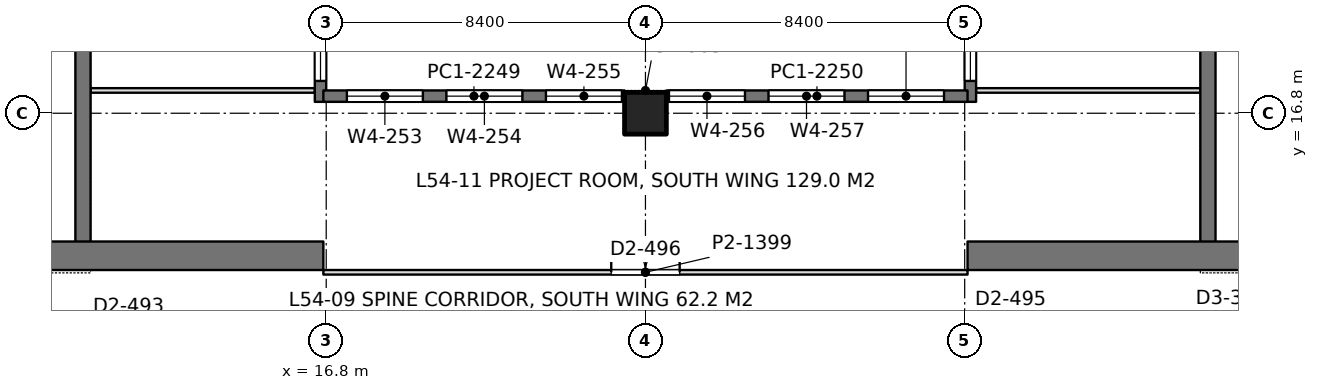
"""IFC4 building model, lengths in metres.
Left out: names, types, materials, properties, quantities, classifications, styles, units other than length and angle.
Written with IfcOpenShell. Run it as: python <this file> out.ifc"""

import sys

from ifc_helpers import new_model, si_unit, direction, frame, frame_2d, origin, origin_2d, place, context, subcontext, project, spatial, rectangle, extrude, element, fill, save


model = new_model("IFC4")
c1 = context("Model", 3, precision=1e-05, world=origin(), true_north=direction((0.0, 1.0)))
c2 = subcontext(c1, "Body", "Model", "MODEL_VIEW")
j1 = project(units=[si_unit("LENGTHUNIT", "METRE"), si_unit("PLANEANGLEUNIT", "RADIAN")], contexts=[c1])
p1 = place(None, origin())
s1 = spatial("IfcSite", under=j1, at=p1, CompositionType="ELEMENT")
p2 = place(p1, origin())
s2 = spatial("IfcBuilding", under=s1, at=p2, CompositionType="ELEMENT")
p3 = place(p2, frame((0.0, 0.0, 236.4)))
s3 = spatial("IfcBuildingStorey", under=s2, at=p3, CompositionType="ELEMENT", Elevation=236.4)
p4 = place(p3, frame((25.2, 16.8, 0.0), z_axis=(0.0, 0.0, 1.0), x_axis=(1.0, 0.0, 0.0)))
e1 = element("IfcColumn", 1, at=p4, inside=s3, PredefinedType="COLUMN", context=c2, shape_type="SweptSolid", body=[
    extrude(rectangle(XDim=1.1, YDim=1.1, at=origin_2d()), origin(), (0.0, 0.0, 1.0), 4.2),
])
p5 = place(p3, frame((-1.125, 13.05, 0.0), z_axis=(0.0, 0.0, 1.0), x_axis=(1.0, 0.0, 0.0)))
e2 = element("IfcWall", 2, at=p5, inside=s3, PredefinedType="SHEAR", context=c2, shape_type="SweptSolid", body=[
    extrude(rectangle(XDim=17.85, YDim=0.75, at=frame_2d((8.925, 0.0))), origin(), (0.0, 0.0, 1.0), 4.2),
])
p6 = place(p5, frame((8.875, 0.0, 0.0)))
e3 = element("IfcOpeningElement", 3, at=p6, cuts=e2, PredefinedType="OPENING", context=c2, shape_type="SweptSolid", body=[
    extrude(rectangle(XDim=1.8, YDim=2.4, at=frame_2d((0.9, 1.2))), frame((0.0, 0.385, 0.0), z_axis=(0.0, -1.0, 0.0), x_axis=(1.0, 0.0, 0.0)), (0.0, 0.0, 1.0), 0.77),
])
p7 = place(p3, frame((10.4, 13.05, 0.0), z_axis=(0.0, 0.0, 1.0), x_axis=(0.0, 1.0, 0.0)))
e4 = element("IfcWall", 4, at=p7, inside=s3, PredefinedType="SHEAR", context=c2, shape_type="SweptSolid", body=[
    extrude(rectangle(XDim=24.3, YDim=0.4, at=frame_2d((12.15, 0.0))), origin(), (0.0, 0.0, 1.0), 4.2),
])
p8 = place(p7, frame((15.75, 0.0, 0.0)))
e5 = element("IfcOpeningElement", 5, at=p8, cuts=e4, PredefinedType="OPENING", context=c2, shape_type="SweptSolid", body=[
    extrude(rectangle(XDim=1.1, YDim=2.2, at=frame_2d((0.55, 1.1))), frame((0.0, 0.21, 0.0), z_axis=(0.0, -1.0, 0.0), x_axis=(1.0, 0.0, 0.0)), (0.0, 0.0, 1.0), 0.42),
])
p9 = place(p7, frame((18.6, 0.0, 0.0)))
e6 = element("IfcOpeningElement", 6, at=p9, cuts=e4, PredefinedType="OPENING", context=c2, shape_type="SweptSolid", body=[
    extrude(rectangle(XDim=1.1, YDim=2.2, at=frame_2d((0.55, 1.1))), frame((0.0, 0.21, 0.0), z_axis=(0.0, -1.0, 0.0), x_axis=(1.0, 0.0, 0.0)), (0.0, 0.0, 1.0), 0.42),
])
p10 = place(p7, frame((21.45, 0.0, 0.0)))
e7 = element("IfcOpeningElement", 7, at=p10, cuts=e4, PredefinedType="OPENING", context=c2, shape_type="SweptSolid", body=[
    extrude(rectangle(XDim=1.1, YDim=2.2, at=frame_2d((0.55, 1.1))), frame((0.0, 0.21, 0.0), z_axis=(0.0, -1.0, 0.0), x_axis=(1.0, 0.0, 0.0)), (0.0, 0.0, 1.0), 0.42),
])
p11 = place(p7, frame((6.05, 0.0, 0.0)))
e8 = element("IfcOpeningElement", 8, at=p11, cuts=e4, PredefinedType="OPENING", context=c2, shape_type="SweptSolid", body=[
    extrude(rectangle(XDim=1.8, YDim=2.4, at=frame_2d((0.9, 1.2))), frame((0.0, 0.21, 0.0), z_axis=(0.0, -1.0, 0.0), x_axis=(1.0, 0.0, 0.0)), (0.0, 0.0, 1.0), 0.42),
])
p12 = place(p7, frame((11.25, 0.0, 0.0)))
e9 = element("IfcOpeningElement", 9, at=p12, cuts=e4, PredefinedType="OPENING", context=c2, shape_type="SweptSolid", body=[
    extrude(rectangle(XDim=1.8, YDim=2.4, at=frame_2d((0.9, 1.2))), frame((0.0, 0.21, 0.0), z_axis=(0.0, -1.0, 0.0), x_axis=(1.0, 0.0, 0.0)), (0.0, 0.0, 1.0), 0.42),
])
p13 = place(p3, frame((33.675, 13.05, 0.0), z_axis=(0.0, 0.0, 1.0), x_axis=(1.0, 0.0, 0.0)))
e10 = element("IfcWall", 10, at=p13, inside=s3, PredefinedType="SHEAR", context=c2, shape_type="SweptSolid", body=[
    extrude(rectangle(XDim=17.85, YDim=0.75, at=frame_2d((8.925, 0.0))), origin(), (0.0, 0.0, 1.0), 4.2),
])
p14 = place(p13, frame((7.175, 0.0, 0.0)))
e11 = element("IfcOpeningElement", 11, at=p14, cuts=e10, PredefinedType="OPENING", context=c2, shape_type="SweptSolid", body=[
    extrude(rectangle(XDim=1.8, YDim=2.4, at=frame_2d((0.9, 1.2))), frame((0.0, 0.385, 0.0), z_axis=(0.0, -1.0, 0.0), x_axis=(1.0, 0.0, 0.0)), (0.0, 0.0, 1.0), 0.77),
])
p15 = place(p3, frame((40.0, 13.05, 0.0), z_axis=(0.0, 0.0, 1.0), x_axis=(0.0, 1.0, 0.0)))
e12 = element("IfcWall", 12, at=p15, inside=s3, PredefinedType="SHEAR", context=c2, shape_type="SweptSolid", body=[
    extrude(rectangle(XDim=24.3, YDim=0.4, at=frame_2d((12.15, 0.0))), origin(), (0.0, 0.0, 1.0), 4.2),
])
p16 = place(p15, frame((15.75, 0.0, 0.0)))
e13 = element("IfcOpeningElement", 13, at=p16, cuts=e12, PredefinedType="OPENING", context=c2, shape_type="SweptSolid", body=[
    extrude(rectangle(XDim=1.1, YDim=2.2, at=frame_2d((0.55, 1.1))), frame((0.0, 0.21, 0.0), z_axis=(0.0, -1.0, 0.0), x_axis=(1.0, 0.0, 0.0)), (0.0, 0.0, 1.0), 0.42),
])
p17 = place(p15, frame((18.6, 0.0, 0.0)))
e14 = element("IfcOpeningElement", 14, at=p17, cuts=e12, PredefinedType="OPENING", context=c2, shape_type="SweptSolid", body=[
    extrude(rectangle(XDim=1.1, YDim=2.2, at=frame_2d((0.55, 1.1))), frame((0.0, 0.21, 0.0), z_axis=(0.0, -1.0, 0.0), x_axis=(1.0, 0.0, 0.0)), (0.0, 0.0, 1.0), 0.42),
])
p18 = place(p15, frame((21.45, 0.0, 0.0)))
e15 = element("IfcOpeningElement", 15, at=p18, cuts=e12, PredefinedType="OPENING", context=c2, shape_type="SweptSolid", body=[
    extrude(rectangle(XDim=1.1, YDim=2.2, at=frame_2d((0.55, 1.1))), frame((0.0, 0.21, 0.0), z_axis=(0.0, -1.0, 0.0), x_axis=(1.0, 0.0, 0.0)), (0.0, 0.0, 1.0), 0.42),
])
p19 = place(p15, frame((6.05, 0.0, 0.0)))
e16 = element("IfcOpeningElement", 16, at=p19, cuts=e12, PredefinedType="OPENING", context=c2, shape_type="SweptSolid", body=[
    extrude(rectangle(XDim=1.8, YDim=2.4, at=frame_2d((0.9, 1.2))), frame((0.0, 0.21, 0.0), z_axis=(0.0, -1.0, 0.0), x_axis=(1.0, 0.0, 0.0)), (0.0, 0.0, 1.0), 0.42),
])
p20 = place(p15, frame((11.25, 0.0, 0.0)))
e17 = element("IfcOpeningElement", 17, at=p20, cuts=e12, PredefinedType="OPENING", context=c2, shape_type="SweptSolid", body=[
    extrude(rectangle(XDim=1.8, YDim=2.4, at=frame_2d((0.9, 1.2))), frame((0.0, 0.21, 0.0), z_axis=(0.0, -1.0, 0.0), x_axis=(1.0, 0.0, 0.0)), (0.0, 0.0, 1.0), 0.42),
])
p21 = place(p3, frame((16.65, 17.1, 0.0), z_axis=(0.0, 0.0, 1.0), x_axis=(0.0, 1.0, 0.0)))
e18 = element("IfcWall", 18, at=p21, inside=s3, PredefinedType="SOLIDWALL", context=c2, shape_type="SweptSolid", body=[
    extrude(rectangle(XDim=10.7, YDim=0.3, at=frame_2d((5.35, 0.0))), origin(), (0.0, 0.0, 1.0), 4.05),
])
p22 = place(p21, frame((0.55, 0.0, 0.9)))
e19 = element("IfcOpeningElement", 19, at=p22, cuts=e18, PredefinedType="OPENING", context=c2, shape_type="SweptSolid", body=[
    extrude(rectangle(XDim=2.0, YDim=1.9, at=frame_2d((1.0, 0.95))), frame((0.0, 0.16, 0.0), z_axis=(0.0, -1.0, 0.0), x_axis=(1.0, 0.0, 0.0)), (0.0, 0.0, 1.0), 0.32),
])
p23 = place(p21, frame((2.9, 0.0, 0.9)))
e20 = element("IfcOpeningElement", 20, at=p23, cuts=e18, PredefinedType="OPENING", context=c2, shape_type="SweptSolid", body=[
    extrude(rectangle(XDim=2.0, YDim=1.9, at=frame_2d((1.0, 0.95))), frame((0.0, 0.16, 0.0), z_axis=(0.0, -1.0, 0.0), x_axis=(1.0, 0.0, 0.0)), (0.0, 0.0, 1.0), 0.32),
])
p24 = place(p21, frame((7.675, 0.0, 0.9)))
e21 = element("IfcOpeningElement", 21, at=p24, cuts=e18, PredefinedType="OPENING", context=c2, shape_type="SweptSolid", body=[
    extrude(rectangle(XDim=2.0, YDim=1.9, at=frame_2d((1.0, 0.95))), frame((0.0, 0.16, 0.0), z_axis=(0.0, -1.0, 0.0), x_axis=(1.0, 0.0, 0.0)), (0.0, 0.0, 1.0), 0.32),
])
p25 = place(p3, frame((33.75, 17.1, 0.0), z_axis=(0.0, 0.0, 1.0), x_axis=(0.0, 1.0, 0.0)))
e22 = element("IfcWall", 22, at=p25, inside=s3, PredefinedType="SOLIDWALL", context=c2, shape_type="SweptSolid", body=[
    extrude(rectangle(XDim=10.7, YDim=0.3, at=frame_2d((5.35, 0.0))), origin(), (0.0, 0.0, 1.0), 4.05),
])
p26 = place(p25, frame((0.55, 0.0, 0.9)))
e23 = element("IfcOpeningElement", 23, at=p26, cuts=e22, PredefinedType="OPENING", context=c2, shape_type="SweptSolid", body=[
    extrude(rectangle(XDim=2.0, YDim=1.9, at=frame_2d((1.0, 0.95))), frame((0.0, 0.16, 0.0), z_axis=(0.0, -1.0, 0.0), x_axis=(1.0, 0.0, 0.0)), (0.0, 0.0, 1.0), 0.32),
])
p27 = place(p25, frame((2.9, 0.0, 0.9)))
e24 = element("IfcOpeningElement", 24, at=p27, cuts=e22, PredefinedType="OPENING", context=c2, shape_type="SweptSolid", body=[
    extrude(rectangle(XDim=2.0, YDim=1.9, at=frame_2d((1.0, 0.95))), frame((0.0, 0.16, 0.0), z_axis=(0.0, -1.0, 0.0), x_axis=(1.0, 0.0, 0.0)), (0.0, 0.0, 1.0), 0.32),
])
p28 = place(p25, frame((7.675, 0.0, 0.9)))
e25 = element("IfcOpeningElement", 25, at=p28, cuts=e22, PredefinedType="OPENING", context=c2, shape_type="SweptSolid", body=[
    extrude(rectangle(XDim=2.0, YDim=1.9, at=frame_2d((1.0, 0.95))), frame((0.0, 0.16, 0.0), z_axis=(0.0, -1.0, 0.0), x_axis=(1.0, 0.0, 0.0)), (0.0, 0.0, 1.0), 0.32),
])
p29 = place(p3, frame((16.725, 17.25, 0.0), z_axis=(0.0, 0.0, 1.0), x_axis=(1.0, 0.0, 0.0)))
e26 = element("IfcWall", 26, at=p29, inside=s3, PredefinedType="SOLIDWALL", context=c2, shape_type="SweptSolid", body=[
    extrude(rectangle(XDim=7.925, YDim=0.3, at=frame_2d((3.962, 0.0))), origin(), (0.0, 0.0, 1.0), 4.05),
])
p30 = place(p29, frame((0.619, 0.0, 0.9)))
e27 = element("IfcOpeningElement", 27, at=p30, cuts=e26, PredefinedType="OPENING", context=c2, shape_type="SweptSolid", body=[
    extrude(rectangle(XDim=2.0, YDim=1.9, at=frame_2d((1.0, 0.95))), frame((0.0, 0.16, 0.0), z_axis=(0.0, -1.0, 0.0), x_axis=(1.0, 0.0, 0.0)), (0.0, 0.0, 1.0), 0.32),
])
p31 = place(p29, frame((3.238, 0.0, 0.9)))
e28 = element("IfcOpeningElement", 28, at=p31, cuts=e26, PredefinedType="OPENING", context=c2, shape_type="SweptSolid", body=[
    extrude(rectangle(XDim=2.0, YDim=1.9, at=frame_2d((1.0, 0.95))), frame((0.0, 0.16, 0.0), z_axis=(0.0, -1.0, 0.0), x_axis=(1.0, 0.0, 0.0)), (0.0, 0.0, 1.0), 0.32),
])
p32 = place(p29, frame((5.856, 0.0, 0.9)))
e29 = element("IfcOpeningElement", 29, at=p32, cuts=e26, PredefinedType="OPENING", context=c2, shape_type="SweptSolid", body=[
    extrude(rectangle(XDim=2.0, YDim=1.9, at=frame_2d((1.0, 0.95))), frame((0.0, 0.16, 0.0), z_axis=(0.0, -1.0, 0.0), x_axis=(1.0, 0.0, 0.0)), (0.0, 0.0, 1.0), 0.32),
])
p33 = place(p3, frame((25.75, 17.25, 0.0), z_axis=(0.0, 0.0, 1.0), x_axis=(1.0, 0.0, 0.0)))
e30 = element("IfcWall", 30, at=p33, inside=s3, PredefinedType="SOLIDWALL", context=c2, shape_type="SweptSolid", body=[
    extrude(rectangle(XDim=7.925, YDim=0.3, at=frame_2d((3.962, 0.0))), origin(), (0.0, 0.0, 1.0), 4.05),
])
p34 = place(p33, frame((0.069, 0.0, 0.9)))
e31 = element("IfcOpeningElement", 31, at=p34, cuts=e30, PredefinedType="OPENING", context=c2, shape_type="SweptSolid", body=[
    extrude(rectangle(XDim=2.0, YDim=1.9, at=frame_2d((1.0, 0.95))), frame((0.0, 0.16, 0.0), z_axis=(0.0, -1.0, 0.0), x_axis=(1.0, 0.0, 0.0)), (0.0, 0.0, 1.0), 0.32),
])
p35 = place(p33, frame((2.688, 0.0, 0.9)))
e32 = element("IfcOpeningElement", 32, at=p35, cuts=e30, PredefinedType="OPENING", context=c2, shape_type="SweptSolid", body=[
    extrude(rectangle(XDim=2.0, YDim=1.9, at=frame_2d((1.0, 0.95))), frame((0.0, 0.16, 0.0), z_axis=(0.0, -1.0, 0.0), x_axis=(1.0, 0.0, 0.0)), (0.0, 0.0, 1.0), 0.32),
])
p36 = place(p33, frame((5.306, 0.0, 0.9)))
e33 = element("IfcOpeningElement", 33, at=p36, cuts=e30, PredefinedType="OPENING", context=c2, shape_type="SweptSolid", body=[
    extrude(rectangle(XDim=2.0, YDim=1.9, at=frame_2d((1.0, 0.95))), frame((0.0, 0.16, 0.0), z_axis=(0.0, -1.0, 0.0), x_axis=(1.0, 0.0, 0.0)), (0.0, 0.0, 1.0), 0.32),
])
for number, where, z_axis, x_axis in (
    (34, (10.598, 17.4, 0.0), (0.0, 0.0, 1.0), (1.0, 0.0, 0.0)),
    (35, (33.898, 17.4, 0.0), (0.0, 0.0, 1.0), (1.0, 0.0, 0.0)),
):
    element("IfcWall", number, at=place(p3, frame(where, z_axis=z_axis, x_axis=x_axis)), inside=s3, PredefinedType="PARTITIONING", context=c2, shape_type="SweptSolid", body=[
        extrude(rectangle(XDim=5.904, YDim=0.12, at=frame_2d((2.952, 0.0))), origin(), (0.0, 0.0, 1.0), 3.55),
    ])
p37 = place(p3, frame((16.725, 12.615, 0.0), z_axis=(0.0, 0.0, 1.0), x_axis=(1.0, 0.0, 0.0)))
e36 = element("IfcWall", 36, at=p37, inside=s3, PredefinedType="PARTITIONING", context=c2, shape_type="SweptSolid", body=[
    extrude(rectangle(XDim=16.95, YDim=0.12, at=frame_2d((8.475, 0.0))), origin(), (0.0, 0.0, 1.0), 3.55),
])
p38 = place(p37, frame((7.575, 0.0, 0.0)))
e37 = element("IfcOpeningElement", 37, at=p38, cuts=e36, PredefinedType="OPENING", context=c2, shape_type="SweptSolid", body=[
    extrude(rectangle(XDim=1.8, YDim=2.2, at=frame_2d((0.9, 1.1))), frame((0.0, 0.07, 0.0), z_axis=(0.0, -1.0, 0.0), x_axis=(1.0, 0.0, 0.0)), (0.0, 0.0, 1.0), 0.14),
])
p39 = place(p22, origin())
e38 = element("IfcWindow", 38, at=p39, inside=s3, PartitioningType="SINGLE_PANEL", PredefinedType="WINDOW", context=c2, shape_type="SweptSolid", body=[
    extrude(rectangle(XDim=2.0, YDim=1.9, at=frame_2d((1.0, 0.95))), frame((0.0, 0.03, 0.0), z_axis=(0.0, -1.0, 0.0), x_axis=(1.0, 0.0, 0.0)), (0.0, 0.0, 1.0), 0.06),
])
fill(e19, e38)
p40 = place(p26, origin())
e39 = element("IfcWindow", 39, at=p40, inside=s3, PartitioningType="SINGLE_PANEL", PredefinedType="WINDOW", context=c2, shape_type="SweptSolid", body=[
    extrude(rectangle(XDim=2.0, YDim=1.9, at=frame_2d((1.0, 0.95))), frame((0.0, 0.03, 0.0), z_axis=(0.0, -1.0, 0.0), x_axis=(1.0, 0.0, 0.0)), (0.0, 0.0, 1.0), 0.06),
])
fill(e23, e39)
p41 = place(p30, origin())
e40 = element("IfcWindow", 40, at=p41, inside=s3, PartitioningType="SINGLE_PANEL", PredefinedType="WINDOW", context=c2, shape_type="SweptSolid", body=[
    extrude(rectangle(XDim=2.0, YDim=1.9, at=frame_2d((1.0, 0.95))), frame((0.0, 0.03, 0.0), z_axis=(0.0, -1.0, 0.0), x_axis=(1.0, 0.0, 0.0)), (0.0, 0.0, 1.0), 0.06),
])
fill(e27, e40)
p42 = place(p31, origin())
e41 = element("IfcWindow", 41, at=p42, inside=s3, PartitioningType="SINGLE_PANEL", PredefinedType="WINDOW", context=c2, shape_type="SweptSolid", body=[
    extrude(rectangle(XDim=2.0, YDim=1.9, at=frame_2d((1.0, 0.95))), frame((0.0, 0.03, 0.0), z_axis=(0.0, -1.0, 0.0), x_axis=(1.0, 0.0, 0.0)), (0.0, 0.0, 1.0), 0.06),
])
fill(e28, e41)
p43 = place(p32, origin())
e42 = element("IfcWindow", 42, at=p43, inside=s3, PartitioningType="SINGLE_PANEL", PredefinedType="WINDOW", context=c2, shape_type="SweptSolid", body=[
    extrude(rectangle(XDim=2.0, YDim=1.9, at=frame_2d((1.0, 0.95))), frame((0.0, 0.03, 0.0), z_axis=(0.0, -1.0, 0.0), x_axis=(1.0, 0.0, 0.0)), (0.0, 0.0, 1.0), 0.06),
])
fill(e29, e42)
p44 = place(p34, origin())
e43 = element("IfcWindow", 43, at=p44, inside=s3, PartitioningType="SINGLE_PANEL", PredefinedType="WINDOW", context=c2, shape_type="SweptSolid", body=[
    extrude(rectangle(XDim=2.0, YDim=1.9, at=frame_2d((1.0, 0.95))), frame((0.0, 0.03, 0.0), z_axis=(0.0, -1.0, 0.0), x_axis=(1.0, 0.0, 0.0)), (0.0, 0.0, 1.0), 0.06),
])
fill(e31, e43)
p45 = place(p35, origin())
e44 = element("IfcWindow", 44, at=p45, inside=s3, PartitioningType="SINGLE_PANEL", PredefinedType="WINDOW", context=c2, shape_type="SweptSolid", body=[
    extrude(rectangle(XDim=2.0, YDim=1.9, at=frame_2d((1.0, 0.95))), frame((0.0, 0.03, 0.0), z_axis=(0.0, -1.0, 0.0), x_axis=(1.0, 0.0, 0.0)), (0.0, 0.0, 1.0), 0.06),
])
fill(e32, e44)
p46 = place(p36, origin())
e45 = element("IfcWindow", 45, at=p46, inside=s3, PartitioningType="SINGLE_PANEL", PredefinedType="WINDOW", context=c2, shape_type="SweptSolid", body=[
    extrude(rectangle(XDim=2.0, YDim=1.9, at=frame_2d((1.0, 0.95))), frame((0.0, 0.03, 0.0), z_axis=(0.0, -1.0, 0.0), x_axis=(1.0, 0.0, 0.0)), (0.0, 0.0, 1.0), 0.06),
])
fill(e33, e45)
p47 = place(p38, origin())
e46 = element("IfcDoor", 46, at=p47, inside=s3, OperationType="DOUBLE_DOOR_SINGLE_SWING", PredefinedType="DOOR", context=c2, shape_type="SweptSolid", body=[
    extrude(rectangle(XDim=1.8, YDim=2.2, at=frame_2d((0.9, 1.1))), frame((0.0, 0.025, 0.0), z_axis=(0.0, -1.0, 0.0), x_axis=(1.0, 0.0, 0.0)), (0.0, 0.0, 1.0), 0.05),
])
fill(e37, e46)
save(model, sys.argv[1])
